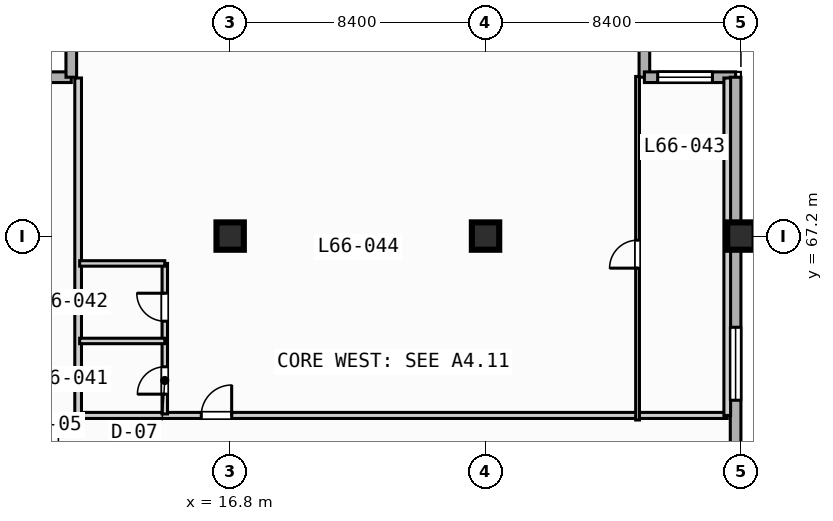
"""IFC4 building model, lengths in metres.
Left out: names, types, materials, properties, quantities, classifications, styles, units other than length and angle.
Written with IfcOpenShell. Run it as: python <this file> out.ifc"""

import sys

from ifc_helpers import new_model, si_unit, direction, frame, frame_2d, origin, origin_2d, place, context, subcontext, project, spatial, rectangle, extrude, element, fill, save


model = new_model("IFC4")
c1 = context("Model", 3, precision=1e-05, world=origin(), true_north=direction((0.0, 1.0)))
c2 = subcontext(c1, "Body", "Model", "MODEL_VIEW")
j1 = project(units=[si_unit("LENGTHUNIT", "METRE"), si_unit("PLANEANGLEUNIT", "RADIAN")], contexts=[c1])
p1 = place(None, origin())
s1 = spatial("IfcSite", under=j1, at=p1, CompositionType="ELEMENT")
p2 = place(p1, origin())
s2 = spatial("IfcBuilding", under=s1, at=p2, CompositionType="ELEMENT")
p3 = place(p2, frame((0.0, 0.0, 267.5)))
s3 = spatial("IfcBuildingStorey", under=s2, at=p3, CompositionType="ELEMENT", Elevation=267.5)
for number, where, z_axis, x_axis in (
    (1, (16.8, 67.2, 0.0), (0.0, 0.0, 1.0), (1.0, 0.0, 0.0)),
    (2, (25.2, 67.2, 0.0), (0.0, 0.0, 1.0), (1.0, 0.0, 0.0)),
    (3, (33.6, 67.2, 0.0), (0.0, 0.0, 1.0), (1.0, 0.0, 0.0)),
):
    element("IfcColumn", number, at=place(p3, frame(where, z_axis=z_axis, x_axis=x_axis)), inside=s3, PredefinedType="COLUMN", context=c2, shape_type="SweptSolid", body=[
        extrude(rectangle(XDim=0.9, YDim=0.9, at=origin_2d()), origin(), (0.0, 0.0, 1.0), 3.7),
    ])
for number, where, z_axis, x_axis in (
    (4, (8.575, 72.425, 0.0), (0.0, 0.0, 1.0), (1.0, 0.0, 0.0)),
    (5, (11.575, 72.425, 0.0), (0.0, 0.0, 1.0), (0.0, 1.0, 0.0)),
    (6, (30.425, 75.425, 0.0), (0.0, 0.0, 1.0), (0.0, -1.0, 0.0)),
):
    element("IfcWall", number, at=place(p3, frame(where, z_axis=z_axis, x_axis=x_axis)), inside=s3, PredefinedType="STANDARD", context=c2, shape_type="SweptSolid", body=[
        extrude(rectangle(XDim=3.0, YDim=0.35, at=frame_2d((1.5, 0.0))), origin(), (0.0, 0.0, 1.0), 3.47),
    ])
p4 = place(p3, frame((30.425, 72.425, 0.0), z_axis=(0.0, 0.0, 1.0), x_axis=(1.0, 0.0, 0.0)))
e7 = element("IfcWall", 7, at=p4, inside=s3, PredefinedType="STANDARD", context=c2, shape_type="SweptSolid", body=[
    extrude(rectangle(XDim=3.0, YDim=0.35, at=frame_2d((1.5, 0.0))), origin(), (0.0, 0.0, 1.0), 3.47),
])
p5 = place(p4, frame((0.438, 0.0, 0.85)))
e8 = element("IfcOpeningElement", 8, at=p5, cuts=e7, PredefinedType="OPENING", context=c2, shape_type="SweptSolid", body=[
    extrude(rectangle(XDim=1.8, YDim=1.8, at=frame_2d((0.9, 0.9))), frame((0.0, 0.185, 0.0), z_axis=(0.0, -1.0, 0.0), x_axis=(1.0, 0.0, 0.0)), (0.0, 0.0, 1.0), 0.37),
])
p6 = place(p3, frame((33.425, 72.425, 0.0), z_axis=(0.0, 0.0, 1.0), x_axis=(0.0, -1.0, 0.0)))
e9 = element("IfcWall", 9, at=p6, inside=s3, PredefinedType="STANDARD", context=c2, shape_type="SweptSolid", body=[
    extrude(rectangle(XDim=39.0, YDim=0.35, at=frame_2d((19.5, 0.0))), origin(), (0.0, 0.0, 1.0), 3.47),
])
p7 = place(p6, frame((33.725, 0.0, 0.85)))
e10 = element("IfcOpeningElement", 10, at=p7, cuts=e9, PredefinedType="OPENING", context=c2, shape_type="SweptSolid", body=[
    extrude(rectangle(XDim=1.8, YDim=1.8, at=frame_2d((0.9, 0.9))), frame((0.0, 0.185, 0.0), z_axis=(0.0, -1.0, 0.0), x_axis=(1.0, 0.0, 0.0)), (0.0, 0.0, 1.0), 0.37),
])
p8 = place(p6, frame((8.225, 0.0, 0.85)))
e11 = element("IfcOpeningElement", 11, at=p8, cuts=e9, PredefinedType="OPENING", context=c2, shape_type="SweptSolid", body=[
    extrude(rectangle(XDim=2.4, YDim=1.95, at=frame_2d((1.2, 0.975))), frame((0.0, 0.185, 0.0), z_axis=(0.0, -1.0, 0.0), x_axis=(1.0, 0.0, 0.0)), (0.0, 0.0, 1.0), 0.37),
])
p9 = place(p3, frame((11.8, 61.3, 0.0), z_axis=(0.0, 0.0, 1.0), x_axis=(1.0, 0.0, 0.0)))
e12 = element("IfcWall", 12, at=p9, inside=s3, PredefinedType="PARTITIONING", context=c2, shape_type="SweptSolid", body=[
    extrude(rectangle(XDim=21.35, YDim=0.2, at=frame_2d((10.675, 0.0))), origin(), (0.0, 0.0, 1.0), 3.47),
])
p10 = place(p9, frame((4.05, 0.0, 0.0)))
e13 = element("IfcOpeningElement", 13, at=p10, cuts=e12, PredefinedType="OPENING", context=c2, shape_type="SweptSolid", body=[
    extrude(rectangle(XDim=1.0, YDim=2.15, at=frame_2d((0.5, 1.075))), frame((0.0, 0.11, 0.0), z_axis=(0.0, -1.0, 0.0), x_axis=(1.0, 0.0, 0.0)), (0.0, 0.0, 1.0), 0.22),
])
for number, where, z_axis, x_axis in (
    (14, (33.15, 61.3, 0.0), (0.0, 0.0, 1.0), (0.0, 1.0, 0.0)),
    (15, (11.8, 61.3, 0.0), (0.0, 0.0, 1.0), (0.0, 1.0, 0.0)),
):
    element("IfcWall", number, at=place(p3, frame(where, z_axis=z_axis, x_axis=x_axis)), inside=s3, PredefinedType="PARTITIONING", context=c2, shape_type="SweptSolid", body=[
        extrude(rectangle(XDim=11.1, YDim=0.22, at=frame_2d((5.55, 0.0))), origin(), (0.0, 0.0, 1.0), 3.47),
    ])
p11 = place(p3, frame((14.65, 61.35, 0.0), z_axis=(0.0, 0.0, 1.0), x_axis=(0.0, 1.0, 0.0)))
e16 = element("IfcWall", 16, at=p11, inside=s3, PredefinedType="PLUMBINGWALL", context=c2, shape_type="SweptSolid", body=[
    extrude(rectangle(XDim=4.95, YDim=0.18, at=frame_2d((2.475, 0.0))), origin(), (0.0, 0.0, 1.0), 3.47),
])
p12 = place(p11, frame((0.65, 0.0, 0.0)))
e17 = element("IfcOpeningElement", 17, at=p12, cuts=e16, PredefinedType="OPENING", context=c2, shape_type="SweptSolid", body=[
    extrude(rectangle(XDim=0.9, YDim=2.1, at=frame_2d((0.45, 1.05))), frame((0.0, 0.1, 0.0), z_axis=(0.0, -1.0, 0.0), x_axis=(1.0, 0.0, 0.0)), (0.0, 0.0, 1.0), 0.2),
])
p13 = place(p11, frame((3.05, 0.0, 0.0)))
e18 = element("IfcOpeningElement", 18, at=p13, cuts=e16, PredefinedType="OPENING", context=c2, shape_type="SweptSolid", body=[
    extrude(rectangle(XDim=0.92, YDim=2.1, at=frame_2d((0.46, 1.05))), frame((0.0, 0.1, 0.0), z_axis=(0.0, -1.0, 0.0), x_axis=(1.0, 0.0, 0.0)), (0.0, 0.0, 1.0), 0.2),
])
for number, where, z_axis, x_axis in (
    (19, (11.85, 63.75, 0.0), (0.0, 0.0, 1.0), (1.0, 0.0, 0.0)),
    (20, (11.85, 66.3, 0.0), (0.0, 0.0, 1.0), (1.0, 0.0, 0.0)),
):
    element("IfcWall", number, at=place(p3, frame(where, z_axis=z_axis, x_axis=x_axis)), inside=s3, PredefinedType="PLUMBINGWALL", context=c2, shape_type="SweptSolid", body=[
        extrude(rectangle(XDim=2.8, YDim=0.18, at=frame_2d((1.4, 0.0))), origin(), (0.0, 0.0, 1.0), 3.47),
    ])
p14 = place(p3, frame((30.2, 61.15, 0.0), z_axis=(0.0, 0.0, 1.0), x_axis=(0.0, 1.0, 0.0)))
e21 = element("IfcWall", 21, at=p14, inside=s3, PredefinedType="PARTITIONING", context=c2, shape_type="SweptSolid", body=[
    extrude(rectangle(XDim=11.3, YDim=0.125, at=frame_2d((5.65, 0.0))), origin(), (0.0, 0.0, 1.0), 3.47),
])
p15 = place(p14, frame((4.995, 0.0, 0.0)))
e22 = element("IfcOpeningElement", 22, at=p15, cuts=e21, PredefinedType="OPENING", context=c2, shape_type="SweptSolid", body=[
    extrude(rectangle(XDim=0.92, YDim=2.1, at=frame_2d((0.46, 1.05))), frame((0.0, 0.073, 0.0), z_axis=(0.0, -1.0, 0.0), x_axis=(1.0, 0.0, 0.0)), (0.0, 0.0, 1.0), 0.145),
])
p16 = place(p5, origin())
e23 = element("IfcWindow", 23, at=p16, inside=s3, PartitioningType="SINGLE_PANEL", PredefinedType="WINDOW", context=c2, shape_type="SweptSolid", body=[
    extrude(rectangle(XDim=1.8, YDim=1.8, at=frame_2d((0.9, 0.9))), frame((0.0, 0.03, 0.0), z_axis=(0.0, -1.0, 0.0), x_axis=(1.0, 0.0, 0.0)), (0.0, 0.0, 1.0), 0.06),
])
fill(e8, e23)
p17 = place(p8, origin())
e24 = element("IfcWindow", 24, at=p17, inside=s3, PartitioningType="SINGLE_PANEL", PredefinedType="WINDOW", context=c2, shape_type="SweptSolid", body=[
    extrude(rectangle(XDim=2.4, YDim=1.95, at=frame_2d((1.2, 0.975))), frame((0.0, 0.03, 0.0), z_axis=(0.0, -1.0, 0.0), x_axis=(1.0, 0.0, 0.0)), (0.0, 0.0, 1.0), 0.06),
])
fill(e11, e24)
p18 = place(p10, origin())
e25 = element("IfcDoor", 25, at=p18, inside=s3, OperationType="SINGLE_SWING_RIGHT", PredefinedType="DOOR", context=c2, shape_type="SweptSolid", body=[
    extrude(rectangle(XDim=1.0, YDim=2.15, at=frame_2d((0.5, 1.075))), frame((0.0, 0.025, 0.0), z_axis=(0.0, -1.0, 0.0), x_axis=(1.0, 0.0, 0.0)), (0.0, 0.0, 1.0), 0.05),
])
fill(e13, e25)
p19 = place(p12, origin())
e26 = element("IfcDoor", 26, at=p19, inside=s3, OperationType="SINGLE_SWING_LEFT", PredefinedType="DOOR", context=c2, shape_type="SweptSolid", body=[
    extrude(rectangle(XDim=0.9, YDim=2.1, at=frame_2d((0.45, 1.05))), frame((0.0, 0.025, 0.0), z_axis=(0.0, -1.0, 0.0), x_axis=(1.0, 0.0, 0.0)), (0.0, 0.0, 1.0), 0.05),
])
fill(e17, e26)
p20 = place(p13, origin())
e27 = element("IfcDoor", 27, at=p20, inside=s3, OperationType="SINGLE_SWING_RIGHT", PredefinedType="DOOR", context=c2, shape_type="SweptSolid", body=[
    extrude(rectangle(XDim=0.92, YDim=2.1, at=frame_2d((0.46, 1.05))), frame((0.0, 0.025, 0.0), z_axis=(0.0, -1.0, 0.0), x_axis=(1.0, 0.0, 0.0)), (0.0, 0.0, 1.0), 0.05),
])
fill(e18, e27)
p21 = place(p15, origin())
e28 = element("IfcDoor", 28, at=p21, inside=s3, OperationType="SINGLE_SWING_LEFT", PredefinedType="DOOR", context=c2, shape_type="SweptSolid", body=[
    extrude(rectangle(XDim=0.92, YDim=2.1, at=frame_2d((0.46, 1.05))), frame((0.0, 0.025, 0.0), z_axis=(0.0, -1.0, 0.0), x_axis=(1.0, 0.0, 0.0)), (0.0, 0.0, 1.0), 0.05),
])
fill(e22, e28)
save(model, sys.argv[1])
